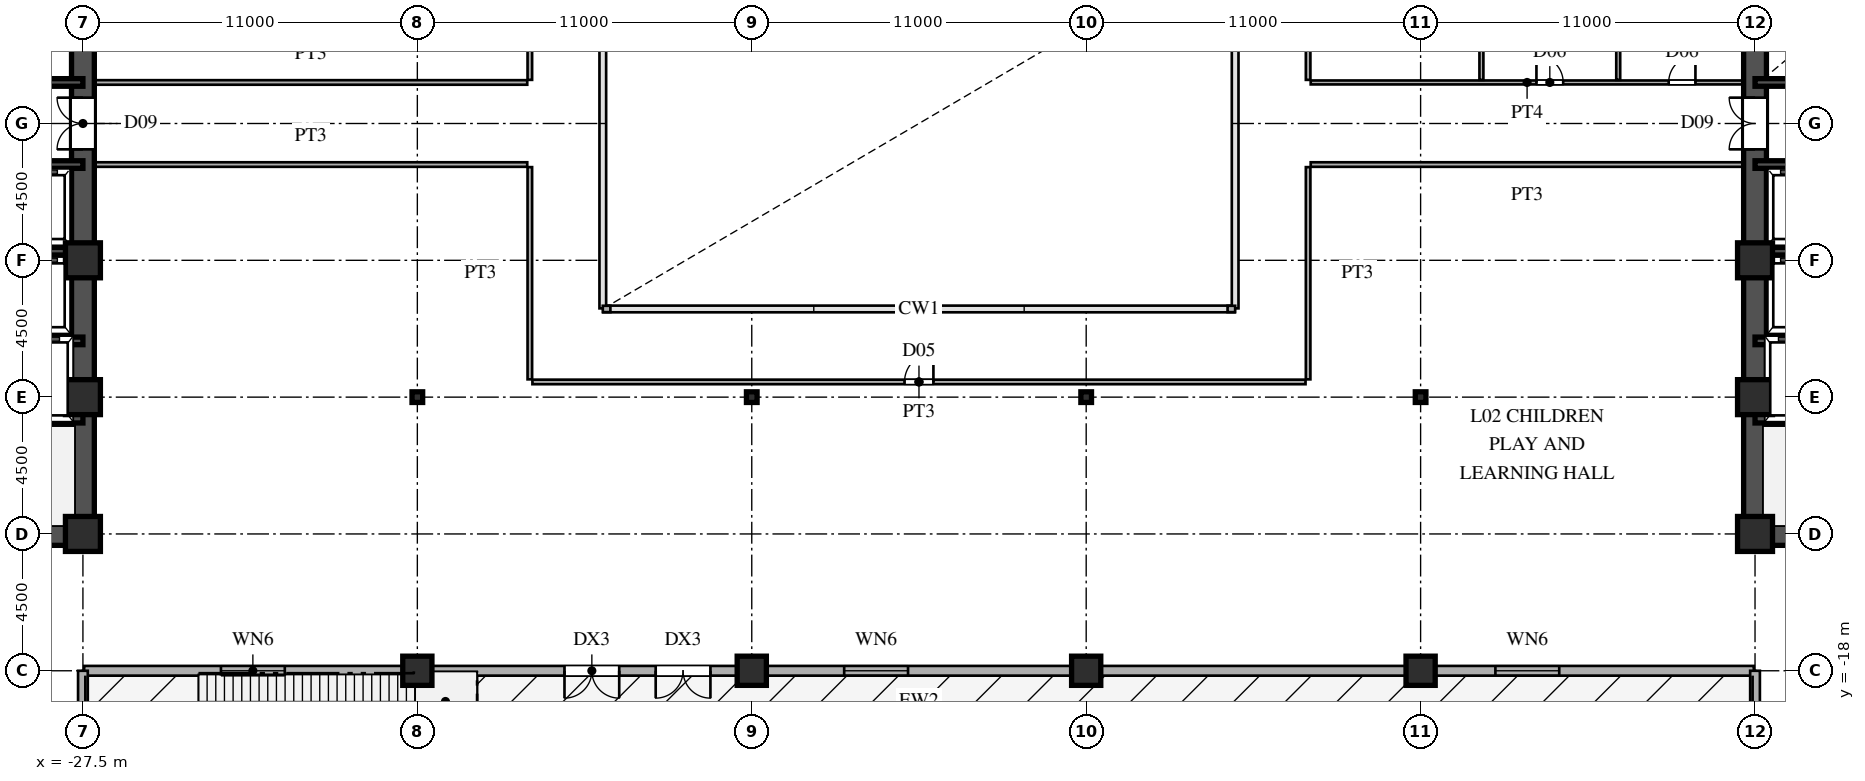
"""IFC4 building model, lengths in metres.
Left out: names, types, materials, properties, quantities, classifications, styles, units other than length and angle.
Written with IfcOpenShell. Run it as: python <this file> out.ifc"""

import sys

from ifc_helpers import new_model, si_unit, direction, frame, frame_2d, origin, origin_2d, place, context, subcontext, project, spatial, rectangle, hollow_rectangle, i_section, extrude, source, transform, mapped, element, fill, save


model = new_model("IFC4")
c1 = context("Model", 3, precision=1e-05, world=origin(), true_north=direction((0.0, 1.0)))
c2 = subcontext(c1, "Body", "Model", "MODEL_VIEW")
j1 = project(units=[si_unit("LENGTHUNIT", "METRE"), si_unit("PLANEANGLEUNIT", "RADIAN")], contexts=[c1])
p1 = place(None, origin())
s1 = spatial("IfcSite", under=j1, at=p1, CompositionType="ELEMENT")
p2 = place(p1, origin())
s2 = spatial("IfcBuilding", under=s1, at=p2, CompositionType="ELEMENT")
p3 = place(p2, frame((0.0, 0.0, 9.9)))
s3 = spatial("IfcBuildingStorey", under=s2, at=p3, CompositionType="ELEMENT", Elevation=9.9)
m1 = source(origin(), c2, "Body", "SweptSolid", [
    extrude(hollow_rectangle(XDim=1.15, YDim=1.15, WallThickness=0.048, at=origin_2d()), origin(), (0.0, 0.0, 1.0), 4.5),
])
for number, where, z_axis, x_axis in (
    (1, (-27.5, -13.5, 0.0), (0.0, 0.0, 1.0), (1.0, 0.0, 0.0)),
    (2, (-27.5, -9.0, 0.0), (0.0, 0.0, 1.0), (1.0, 0.0, 0.0)),
    (3, (-27.5, -4.5, 0.0), (0.0, 0.0, 1.0), (1.0, 0.0, 0.0)),
    (4, (27.5, -13.5, 0.0), (0.0, 0.0, 1.0), (1.0, 0.0, 0.0)),
    (5, (27.5, -9.0, 0.0), (0.0, 0.0, 1.0), (1.0, 0.0, 0.0)),
    (6, (27.5, -4.5, 0.0), (0.0, 0.0, 1.0), (1.0, 0.0, 0.0)),
):
    element("IfcColumn", number, at=place(p3, frame(where, z_axis=z_axis, x_axis=x_axis)), inside=s3, PredefinedType="COLUMN", context=c2, shape_type="MappedRepresentation", body=[
        mapped(m1, transform((0.0, 0.0, 0.0), scale=1.0)),
    ])
m2 = source(origin(), c2, "Body", "SweptSolid", [
    extrude(rectangle(XDim=0.96, YDim=0.96, at=origin_2d()), origin(), (0.0, 0.0, 1.0), 4.5),
])
p4 = place(p3, frame((-16.5, -18.0, 0.0), z_axis=(0.0, 0.0, 1.0), x_axis=(1.0, 0.0, 0.0)))
e7 = element("IfcColumn", 7, at=p4, inside=s3, PredefinedType="COLUMN", context=c2, shape_type="MappedRepresentation", body=[
    mapped(m2, transform((0.0, 0.0, 0.0), scale=1.0)),
])
m3 = source(origin(), c2, "Body", "SweptSolid", [
    extrude(i_section(OverallWidth=0.35, OverallDepth=0.35, WebThickness=0.012, FlangeThickness=0.019, at=origin_2d()), origin(), (0.0, 0.0, 1.0), 4.5),
])
p5 = place(p3, frame((-16.5, -9.0, 0.0), z_axis=(0.0, 0.0, 1.0), x_axis=(1.0, 0.0, 0.0)))
e8 = element("IfcColumn", 8, at=p5, inside=s3, PredefinedType="COLUMN", context=c2, shape_type="MappedRepresentation", body=[
    mapped(m3, transform((0.0, 0.0, 0.0), scale=1.0)),
])
p6 = place(p3, frame((-5.5, -18.0, 0.0), z_axis=(0.0, 0.0, 1.0), x_axis=(1.0, 0.0, 0.0)))
e9 = element("IfcColumn", 9, at=p6, inside=s3, PredefinedType="COLUMN", context=c2, shape_type="MappedRepresentation", body=[
    mapped(m2, transform((0.0, 0.0, 0.0), scale=1.0)),
])
p7 = place(p3, frame((-5.5, -9.0, 0.0), z_axis=(0.0, 0.0, 1.0), x_axis=(1.0, 0.0, 0.0)))
e10 = element("IfcColumn", 10, at=p7, inside=s3, PredefinedType="COLUMN", context=c2, shape_type="MappedRepresentation", body=[
    mapped(m3, transform((0.0, 0.0, 0.0), scale=1.0)),
])
p8 = place(p3, frame((5.5, -18.0, 0.0), z_axis=(0.0, 0.0, 1.0), x_axis=(1.0, 0.0, 0.0)))
e11 = element("IfcColumn", 11, at=p8, inside=s3, PredefinedType="COLUMN", context=c2, shape_type="MappedRepresentation", body=[
    mapped(m2, transform((0.0, 0.0, 0.0), scale=1.0)),
])
p9 = place(p3, frame((5.5, -9.0, 0.0), z_axis=(0.0, 0.0, 1.0), x_axis=(1.0, 0.0, 0.0)))
e12 = element("IfcColumn", 12, at=p9, inside=s3, PredefinedType="COLUMN", context=c2, shape_type="MappedRepresentation", body=[
    mapped(m3, transform((0.0, 0.0, 0.0), scale=1.0)),
])
p10 = place(p3, frame((16.5, -18.0, 0.0), z_axis=(0.0, 0.0, 1.0), x_axis=(1.0, 0.0, 0.0)))
e13 = element("IfcColumn", 13, at=p10, inside=s3, PredefinedType="COLUMN", context=c2, shape_type="MappedRepresentation", body=[
    mapped(m2, transform((0.0, 0.0, 0.0), scale=1.0)),
])
p11 = place(p3, frame((16.5, -9.0, 0.0), z_axis=(0.0, 0.0, 1.0), x_axis=(1.0, 0.0, 0.0)))
e14 = element("IfcColumn", 14, at=p11, inside=s3, PredefinedType="COLUMN", context=c2, shape_type="MappedRepresentation", body=[
    mapped(m3, transform((0.0, 0.0, 0.0), scale=1.0)),
])
p12 = place(p3, frame((-27.5, -23.476, 0.0), z_axis=(0.0, 0.0, 1.0), x_axis=(0.0, 1.0, 0.0)))
e15 = element("IfcWall", 15, at=p12, inside=s3, PredefinedType="SOLIDWALL", context=c2, shape_type="SweptSolid", body=[
    extrude(rectangle(XDim=5.476, YDim=0.32, at=frame_2d((2.738, 0.0))), origin(), (0.0, 0.0, 1.0), 3.632),
])
p13 = place(p3, frame((-27.46, -18.0, 0.0), z_axis=(0.0, 0.0, 1.0), x_axis=(1.0, 0.0, 0.0)))
e16 = element("IfcWall", 16, at=p13, inside=s3, PredefinedType="SOLIDWALL", context=c2, shape_type="SweptSolid", body=[
    extrude(rectangle(XDim=54.92, YDim=0.32, at=frame_2d((27.46, 0.0))), origin(), (0.0, 0.0, 1.0), 3.42),
])
p14 = place(p13, frame((15.8, 0.0, 0.0)))
e17 = element("IfcOpeningElement", 17, at=p14, cuts=e16, PredefinedType="OPENING", context=c2, shape_type="SweptSolid", body=[
    extrude(rectangle(XDim=1.8, YDim=2.3, at=frame_2d((0.9, 1.15))), frame((0.0, 0.17, 0.0), z_axis=(0.0, -1.0, 0.0), x_axis=(1.0, 0.0, 0.0)), (0.0, 0.0, 1.0), 0.34),
])
p15 = place(p13, frame((18.8, 0.0, 0.0)))
e18 = element("IfcOpeningElement", 18, at=p15, cuts=e16, PredefinedType="OPENING", context=c2, shape_type="SweptSolid", body=[
    extrude(rectangle(XDim=1.8, YDim=2.3, at=frame_2d((0.9, 1.15))), frame((0.0, 0.17, 0.0), z_axis=(0.0, -1.0, 0.0), x_axis=(1.0, 0.0, 0.0)), (0.0, 0.0, 1.0), 0.34),
])
p16 = place(p13, frame((4.5, 0.0, 0.8)))
e19 = element("IfcOpeningElement", 19, at=p16, cuts=e16, PredefinedType="OPENING", context=c2, shape_type="SweptSolid", body=[
    extrude(rectangle(XDim=2.1, YDim=2.0, at=frame_2d((1.05, 1.0))), frame((0.0, 0.17, 0.0), z_axis=(0.0, -1.0, 0.0), x_axis=(1.0, 0.0, 0.0)), (0.0, 0.0, 1.0), 0.34),
])
p17 = place(p13, frame((25.0, 0.0, 0.8)))
e20 = element("IfcOpeningElement", 20, at=p17, cuts=e16, PredefinedType="OPENING", context=c2, shape_type="SweptSolid", body=[
    extrude(rectangle(XDim=2.1, YDim=2.0, at=frame_2d((1.05, 1.0))), frame((0.0, 0.17, 0.0), z_axis=(0.0, -1.0, 0.0), x_axis=(1.0, 0.0, 0.0)), (0.0, 0.0, 1.0), 0.34),
])
p18 = place(p13, frame((46.42, 0.0, 0.8)))
e21 = element("IfcOpeningElement", 21, at=p18, cuts=e16, PredefinedType="OPENING", context=c2, shape_type="SweptSolid", body=[
    extrude(rectangle(XDim=2.1, YDim=2.0, at=frame_2d((1.05, 1.0))), frame((0.0, 0.17, 0.0), z_axis=(0.0, -1.0, 0.0), x_axis=(1.0, 0.0, 0.0)), (0.0, 0.0, 1.0), 0.34),
])
p19 = place(p3, frame((27.5, -23.476, 0.0), z_axis=(0.0, 0.0, 1.0), x_axis=(0.0, 1.0, 0.0)))
e22 = element("IfcWall", 22, at=p19, inside=s3, PredefinedType="SOLIDWALL", context=c2, shape_type="SweptSolid", body=[
    extrude(rectangle(XDim=5.476, YDim=0.32, at=frame_2d((2.738, 0.0))), origin(), (0.0, 0.0, 1.0), 3.632),
])
for number, where, z_axis, x_axis in (
    (23, (-10.4, -6.1, 0.0), (0.0, 0.0, 1.0), (1.0, 0.0, 0.0)),
    (24, (10.4, -6.1, 0.0), (0.0, 0.0, 1.0), (-1.0, 0.0, 0.0)),
):
    element("IfcWall", number, at=place(p3, frame(where, z_axis=z_axis, x_axis=x_axis)), inside=s3, PredefinedType="SOLIDWALL", context=c2, shape_type="SweptSolid", body=[
        extrude(rectangle(XDim=0.25, YDim=0.21, at=frame_2d((0.125, 0.0))), origin(), (0.0, 0.0, 1.0), 4.22),
    ])
for number, where, z_axis, x_axis in (
    (25, (-27.5, -13.5, 0.0), (0.0, 0.0, 1.0), (0.0, 1.0, 0.0)),
    (26, (-27.5, 1.3, 0.0), (0.0, 0.0, 1.0), (0.0, 1.0, 0.0)),
):
    element("IfcWall", number, at=place(p3, frame(where, z_axis=z_axis, x_axis=x_axis)), inside=s3, PredefinedType="SHEAR", context=c2, shape_type="SweptSolid", body=[
        extrude(rectangle(XDim=12.2, YDim=0.75, at=frame_2d((6.1, 0.0))), origin(), (0.0, 0.0, 1.0), 4.22),
    ])
p20 = place(p3, frame((-27.5, -1.3, 0.0), z_axis=(0.0, 0.0, 1.0), x_axis=(0.0, 1.0, 0.0)))
e27 = element("IfcWall", 27, at=p20, inside=s3, PredefinedType="SHEAR", context=c2, shape_type="SweptSolid", body=[
    extrude(rectangle(XDim=2.6, YDim=0.75, at=frame_2d((1.3, 0.0))), origin(), (0.0, 0.0, 1.0), 4.22),
])
p21 = place(p20, frame((0.45, 0.0, 0.0)))
e28 = element("IfcOpeningElement", 28, at=p21, cuts=e27, PredefinedType="OPENING", context=c2, shape_type="SweptSolid", body=[
    extrude(rectangle(XDim=1.7, YDim=2.35, at=frame_2d((0.85, 1.175))), frame((0.0, 0.385, 0.0), z_axis=(0.0, -1.0, 0.0), x_axis=(1.0, 0.0, 0.0)), (0.0, 0.0, 1.0), 0.77),
])
p22 = place(p3, frame((-36.5, -13.5, 0.0), z_axis=(0.0, 0.0, 1.0), x_axis=(1.0, 0.0, 0.0)))
e29 = element("IfcWall", 29, at=p22, inside=s3, PredefinedType="SHEAR", context=c2, shape_type="SweptSolid", body=[
    extrude(rectangle(XDim=9.0, YDim=0.75, at=frame_2d((4.5, 0.0))), origin(), (0.0, 0.0, 1.0), 4.22),
])
p23 = place(p3, frame((-36.5, -9.7, 0.0), z_axis=(0.0, 0.0, 1.0), x_axis=(1.0, 0.0, 0.0)))
e30 = element("IfcWall", 30, at=p23, inside=s3, PredefinedType="SHEAR", context=c2, shape_type="SweptSolid", body=[
    extrude(rectangle(XDim=9.0, YDim=0.3, at=frame_2d((4.5, 0.0))), origin(), (0.0, 0.0, 1.0), 4.22),
])
p24 = place(p23, frame((0.6, 0.0, 0.0)))
e31 = element("IfcOpeningElement", 31, at=p24, cuts=e30, PredefinedType="OPENING", context=c2, shape_type="SweptSolid", body=[
    extrude(rectangle(XDim=1.1, YDim=2.2, at=frame_2d((0.55, 1.1))), frame((0.0, 0.16, 0.0), z_axis=(0.0, -1.0, 0.0), x_axis=(1.0, 0.0, 0.0)), (0.0, 0.0, 1.0), 0.32),
])
for number, where, z_axis, x_axis in (
    (32, (-30.3, -7.15, 0.0), (0.0, 0.0, 1.0), (1.0, 0.0, 0.0)),
    (33, (-30.3, -4.2, 0.0), (0.0, 0.0, 1.0), (1.0, 0.0, 0.0)),
    (34, (-30.3, -1.35, 0.0), (0.0, 0.0, 1.0), (1.0, 0.0, 0.0)),
    (35, (-30.3, 1.35, 0.0), (0.0, 0.0, 1.0), (1.0, 0.0, 0.0)),
):
    element("IfcWall", number, at=place(p3, frame(where, z_axis=z_axis, x_axis=x_axis)), inside=s3, PredefinedType="SHEAR", context=c2, shape_type="SweptSolid", body=[
        extrude(rectangle(XDim=2.8, YDim=0.25, at=frame_2d((1.4, 0.0))), origin(), (0.0, 0.0, 1.0), 4.22),
    ])
for number, where, z_axis, x_axis in (
    (36, (27.5, -13.5, 0.0), (0.0, 0.0, 1.0), (0.0, 1.0, 0.0)),
    (37, (27.5, 1.3, 0.0), (0.0, 0.0, 1.0), (0.0, 1.0, 0.0)),
):
    element("IfcWall", number, at=place(p3, frame(where, z_axis=z_axis, x_axis=x_axis)), inside=s3, PredefinedType="SHEAR", context=c2, shape_type="SweptSolid", body=[
        extrude(rectangle(XDim=12.2, YDim=0.75, at=frame_2d((6.1, 0.0))), origin(), (0.0, 0.0, 1.0), 4.22),
    ])
p25 = place(p3, frame((27.5, -1.3, 0.0), z_axis=(0.0, 0.0, 1.0), x_axis=(0.0, 1.0, 0.0)))
e38 = element("IfcWall", 38, at=p25, inside=s3, PredefinedType="SHEAR", context=c2, shape_type="SweptSolid", body=[
    extrude(rectangle(XDim=2.6, YDim=0.75, at=frame_2d((1.3, 0.0))), origin(), (0.0, 0.0, 1.0), 4.22),
])
p26 = place(p25, frame((0.45, 0.0, 0.0)))
e39 = element("IfcOpeningElement", 39, at=p26, cuts=e38, PredefinedType="OPENING", context=c2, shape_type="SweptSolid", body=[
    extrude(rectangle(XDim=1.7, YDim=2.35, at=frame_2d((0.85, 1.175))), frame((0.0, 0.385, 0.0), z_axis=(0.0, -1.0, 0.0), x_axis=(1.0, 0.0, 0.0)), (0.0, 0.0, 1.0), 0.77),
])
p27 = place(p3, frame((27.5, -13.5, 0.0), z_axis=(0.0, 0.0, 1.0), x_axis=(1.0, 0.0, 0.0)))
e40 = element("IfcWall", 40, at=p27, inside=s3, PredefinedType="SHEAR", context=c2, shape_type="SweptSolid", body=[
    extrude(rectangle(XDim=9.0, YDim=0.75, at=frame_2d((4.5, 0.0))), origin(), (0.0, 0.0, 1.0), 4.22),
])
p28 = place(p3, frame((27.5, -9.7, 0.0), z_axis=(0.0, 0.0, 1.0), x_axis=(1.0, 0.0, 0.0)))
e41 = element("IfcWall", 41, at=p28, inside=s3, PredefinedType="SHEAR", context=c2, shape_type="SweptSolid", body=[
    extrude(rectangle(XDim=9.0, YDim=0.3, at=frame_2d((4.5, 0.0))), origin(), (0.0, 0.0, 1.0), 4.22),
])
p29 = place(p28, frame((7.3, 0.0, 0.0)))
e42 = element("IfcOpeningElement", 42, at=p29, cuts=e41, PredefinedType="OPENING", context=c2, shape_type="SweptSolid", body=[
    extrude(rectangle(XDim=1.1, YDim=2.2, at=frame_2d((0.55, 1.1))), frame((0.0, 0.16, 0.0), z_axis=(0.0, -1.0, 0.0), x_axis=(1.0, 0.0, 0.0)), (0.0, 0.0, 1.0), 0.32),
])
for number, where, z_axis, x_axis in (
    (43, (27.5, -7.15, 0.0), (0.0, 0.0, 1.0), (1.0, 0.0, 0.0)),
    (44, (27.5, -4.2, 0.0), (0.0, 0.0, 1.0), (1.0, 0.0, 0.0)),
    (45, (27.5, -1.35, 0.0), (0.0, 0.0, 1.0), (1.0, 0.0, 0.0)),
    (46, (27.5, 1.35, 0.0), (0.0, 0.0, 1.0), (1.0, 0.0, 0.0)),
):
    element("IfcWall", number, at=place(p3, frame(where, z_axis=z_axis, x_axis=x_axis)), inside=s3, PredefinedType="SHEAR", context=c2, shape_type="SweptSolid", body=[
        extrude(rectangle(XDim=2.8, YDim=0.25, at=frame_2d((1.4, 0.0))), origin(), (0.0, 0.0, 1.0), 4.22),
    ])
p30 = place(p3, frame((-12.715, -8.5, 0.0), z_axis=(0.0, 0.0, 1.0), x_axis=(1.0, 0.0, 0.0)))
e47 = element("IfcWall", 47, at=p30, inside=s3, PredefinedType="PARTITIONING", context=c2, shape_type="SweptSolid", body=[
    extrude(rectangle(XDim=25.43, YDim=0.15, at=frame_2d((12.715, 0.0))), origin(), (0.0, 0.0, 1.0), 4.22),
])
p31 = place(p30, frame((12.24, 0.0, 0.0)))
e48 = element("IfcOpeningElement", 48, at=p31, cuts=e47, PredefinedType="OPENING", context=c2, shape_type="SweptSolid", body=[
    extrude(rectangle(XDim=0.95, YDim=2.15, at=frame_2d((0.475, 1.075))), frame((0.0, 0.085, 0.0), z_axis=(0.0, -1.0, 0.0), x_axis=(1.0, 0.0, 0.0)), (0.0, 0.0, 1.0), 0.17),
])
for number, where, z_axis, x_axis in (
    (49, (-27.12, -1.35, 0.0), (0.0, 0.0, 1.0), (1.0, 0.0, 0.0)),
    (50, (12.885, -1.35, 0.0), (0.0, 0.0, 1.0), (1.0, 0.0, 0.0)),
    (51, (-27.12, 1.35, 0.0), (0.0, 0.0, 1.0), (1.0, 0.0, 0.0)),
):
    element("IfcWall", number, at=place(p3, frame(where, z_axis=z_axis, x_axis=x_axis)), inside=s3, PredefinedType="PARTITIONING", context=c2, shape_type="SweptSolid", body=[
        extrude(rectangle(XDim=14.235, YDim=0.15, at=frame_2d((7.118, 0.0))), origin(), (0.0, 0.0, 1.0), 4.22),
    ])
p32 = place(p3, frame((12.885, 1.35, 0.0), z_axis=(0.0, 0.0, 1.0), x_axis=(1.0, 0.0, 0.0)))
e52 = element("IfcWall", 52, at=p32, inside=s3, PredefinedType="PARTITIONING", context=c2, shape_type="SweptSolid", body=[
    extrude(rectangle(XDim=14.235, YDim=0.13, at=frame_2d((7.118, 0.0))), origin(), (0.0, 0.0, 1.0), 4.22),
])
p33 = place(p32, frame((7.425, 0.0, 0.0)))
e53 = element("IfcOpeningElement", 53, at=p33, cuts=e52, PredefinedType="OPENING", context=c2, shape_type="SweptSolid", body=[
    extrude(rectangle(XDim=0.88, YDim=2.1, at=frame_2d((0.44, 1.05))), frame((0.0, 0.075, 0.0), z_axis=(0.0, -1.0, 0.0), x_axis=(1.0, 0.0, 0.0)), (0.0, 0.0, 1.0), 0.15),
])
p34 = place(p32, frame((11.775, 0.0, 0.0)))
e54 = element("IfcOpeningElement", 54, at=p34, cuts=e52, PredefinedType="OPENING", context=c2, shape_type="SweptSolid", body=[
    extrude(rectangle(XDim=0.88, YDim=2.1, at=frame_2d((0.44, 1.05))), frame((0.0, 0.075, 0.0), z_axis=(0.0, -1.0, 0.0), x_axis=(1.0, 0.0, 0.0)), (0.0, 0.0, 1.0), 0.15),
])
for number, where, z_axis, x_axis in (
    (55, (-12.8, -8.415, 0.0), (0.0, 0.0, 1.0), (0.0, 1.0, 0.0)),
    (56, (-12.8, 1.435, 0.0), (0.0, 0.0, 1.0), (0.0, 1.0, 0.0)),
    (57, (12.8, -8.415, 0.0), (0.0, 0.0, 1.0), (0.0, 1.0, 0.0)),
    (58, (12.8, 1.435, 0.0), (0.0, 0.0, 1.0), (0.0, 1.0, 0.0)),
):
    element("IfcWall", number, at=place(p3, frame(where, z_axis=z_axis, x_axis=x_axis)), inside=s3, PredefinedType="PARTITIONING", context=c2, shape_type="SweptSolid", body=[
        extrude(rectangle(XDim=6.98, YDim=0.15, at=frame_2d((3.49, 0.0))), origin(), (0.0, 0.0, 1.0), 4.22),
    ])
p35 = place(p3, frame((18.5, 1.435, 0.0), z_axis=(0.0, 0.0, 1.0), x_axis=(0.0, 1.0, 0.0)))
e59 = element("IfcWall", 59, at=p35, inside=s3, PredefinedType="PARTITIONING", context=c2, shape_type="SweptSolid", body=[
    extrude(rectangle(XDim=16.4, YDim=0.13, at=frame_2d((8.2, 0.0))), origin(), (0.0, 0.0, 1.0), 4.22),
])
p36 = place(p35, frame((9.69, 0.0, 0.0)))
e60 = element("IfcOpeningElement", 60, at=p36, cuts=e59, PredefinedType="OPENING", context=c2, shape_type="SweptSolid", body=[
    extrude(rectangle(XDim=0.95, YDim=2.15, at=frame_2d((0.475, 1.075))), frame((0.0, 0.075, 0.0), z_axis=(0.0, -1.0, 0.0), x_axis=(1.0, 0.0, 0.0)), (0.0, 0.0, 1.0), 0.15),
])
p37 = place(p3, frame((23.0, 1.435, 0.0), z_axis=(0.0, 0.0, 1.0), x_axis=(0.0, 1.0, 0.0)))
e61 = element("IfcWall", 61, at=p37, inside=s3, PredefinedType="PARTITIONING", context=c2, shape_type="SweptSolid", body=[
    extrude(rectangle(XDim=3.68, YDim=0.13, at=frame_2d((1.84, 0.0))), origin(), (0.0, 0.0, 1.0), 4.22),
])
m4 = source(origin(), c2, "Body", "SweptSolid", [
    extrude(rectangle(XDim=1.8, YDim=2.3, at=frame_2d((0.9, 1.15))), frame((0.0, 0.025, 0.0), z_axis=(0.0, -1.0, 0.0), x_axis=(1.0, 0.0, 0.0)), (0.0, 0.0, 1.0), 0.05),
])
p38 = place(p14, frame((1.8, 0.0, 0.0), z_axis=(0.0, 0.0, 1.0), x_axis=(-1.0, 0.0, 0.0)))
e62 = element("IfcDoor", 62, at=p38, inside=s3, OperationType="DOUBLE_SWING_LEFT", PredefinedType="DOOR", context=c2, shape_type="MappedRepresentation", body=[
    mapped(m4, transform((0.0, 0.0, 0.0), scale=1.0)),
])
fill(e17, e62)
p39 = place(p15, frame((1.8, 0.0, 0.0), z_axis=(0.0, 0.0, 1.0), x_axis=(-1.0, 0.0, 0.0)))
e63 = element("IfcDoor", 63, at=p39, inside=s3, OperationType="DOUBLE_SWING_LEFT", PredefinedType="DOOR", context=c2, shape_type="MappedRepresentation", body=[
    mapped(m4, transform((0.0, 0.0, 0.0), scale=1.0)),
])
fill(e18, e63)
m5 = source(origin(), c2, "Body", "SweptSolid", [
    extrude(rectangle(XDim=2.1, YDim=2.0, at=frame_2d((1.05, 1.0))), frame((0.0, 0.03, 0.0), z_axis=(0.0, -1.0, 0.0), x_axis=(1.0, 0.0, 0.0)), (0.0, 0.0, 1.0), 0.06),
])
p40 = place(p16, origin())
e64 = element("IfcWindow", 64, at=p40, inside=s3, PartitioningType="SINGLE_PANEL", PredefinedType="WINDOW", context=c2, shape_type="MappedRepresentation", body=[
    mapped(m5, transform((0.0, 0.0, 0.0), scale=1.0)),
])
fill(e19, e64)
p41 = place(p17, origin())
e65 = element("IfcWindow", 65, at=p41, inside=s3, PartitioningType="SINGLE_PANEL", PredefinedType="WINDOW", context=c2, shape_type="MappedRepresentation", body=[
    mapped(m5, transform((0.0, 0.0, 0.0), scale=1.0)),
])
fill(e20, e65)
p42 = place(p18, origin())
e66 = element("IfcWindow", 66, at=p42, inside=s3, PartitioningType="SINGLE_PANEL", PredefinedType="WINDOW", context=c2, shape_type="MappedRepresentation", body=[
    mapped(m5, transform((0.0, 0.0, 0.0), scale=1.0)),
])
fill(e21, e66)
m6 = source(origin(), c2, "Body", "SweptSolid", [
    extrude(rectangle(XDim=1.7, YDim=2.35, at=frame_2d((0.85, 1.175))), frame((0.0, 0.025, 0.0), z_axis=(0.0, -1.0, 0.0), x_axis=(1.0, 0.0, 0.0)), (0.0, 0.0, 1.0), 0.05),
])
p43 = place(p21, origin())
e67 = element("IfcDoor", 67, at=p43, inside=s3, OperationType="DOUBLE_SWING_LEFT", PredefinedType="DOOR", context=c2, shape_type="MappedRepresentation", body=[
    mapped(m6, transform((0.0, 0.0, 0.0), scale=1.0)),
])
fill(e28, e67)
p44 = place(p26, origin())
e68 = element("IfcDoor", 68, at=p44, inside=s3, OperationType="DOUBLE_SWING_LEFT", PredefinedType="DOOR", context=c2, shape_type="MappedRepresentation", body=[
    mapped(m6, transform((0.0, 0.0, 0.0), scale=1.0)),
])
fill(e39, e68)
m7 = source(origin(), c2, "Body", "SweptSolid", [
    extrude(rectangle(XDim=0.95, YDim=2.15, at=frame_2d((0.475, 1.075))), frame((0.0, 0.025, 0.0), z_axis=(0.0, -1.0, 0.0), x_axis=(1.0, 0.0, 0.0)), (0.0, 0.0, 1.0), 0.05),
])
p45 = place(p31, origin())
e69 = element("IfcDoor", 69, at=p45, inside=s3, OperationType="SINGLE_SWING_RIGHT", PredefinedType="DOOR", context=c2, shape_type="MappedRepresentation", body=[
    mapped(m7, transform((0.0, 0.0, 0.0), scale=1.0)),
])
fill(e48, e69)
m8 = source(origin(), c2, "Body", "SweptSolid", [
    extrude(rectangle(XDim=0.88, YDim=2.1, at=frame_2d((0.44, 1.05))), frame((0.0, 0.025, 0.0), z_axis=(0.0, -1.0, 0.0), x_axis=(1.0, 0.0, 0.0)), (0.0, 0.0, 1.0), 0.05),
])
p46 = place(p33, origin())
e70 = element("IfcDoor", 70, at=p46, inside=s3, OperationType="SINGLE_SWING_LEFT", PredefinedType="DOOR", context=c2, shape_type="MappedRepresentation", body=[
    mapped(m8, transform((0.0, 0.0, 0.0), scale=1.0)),
])
fill(e53, e70)
p47 = place(p34, origin())
e71 = element("IfcDoor", 71, at=p47, inside=s3, OperationType="SINGLE_SWING_RIGHT", PredefinedType="DOOR", context=c2, shape_type="MappedRepresentation", body=[
    mapped(m8, transform((0.0, 0.0, 0.0), scale=1.0)),
])
fill(e54, e71)
save(model, sys.argv[1])
